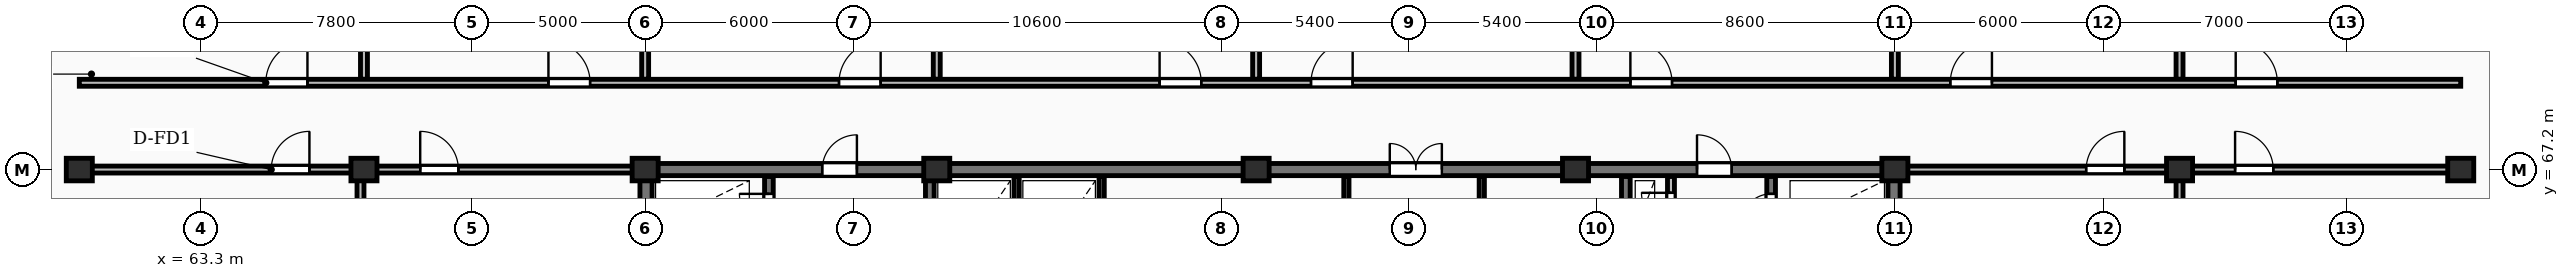
"""IFC4 building model, lengths in metres.
Left out: names, types, materials, properties, quantities, classifications, styles, units other than length and angle.
Written with IfcOpenShell. Run it as: python <this file> out.ifc"""

import sys

from ifc_helpers import new_model, si_unit, direction, frame, frame_2d, origin, origin_2d, place, context, subcontext, project, spatial, rectangle, extrude, element, fill, save


model = new_model("IFC4")
c1 = context("Model", 3, precision=1e-05, world=origin(), true_north=direction((0.0, 1.0)))
c2 = subcontext(c1, "Body", "Model", "MODEL_VIEW")
j1 = project(units=[si_unit("LENGTHUNIT", "METRE"), si_unit("PLANEANGLEUNIT", "RADIAN")], contexts=[c1])
p1 = place(None, origin())
s1 = spatial("IfcSite", under=j1, at=p1, CompositionType="ELEMENT")
p2 = place(p1, origin())
s2 = spatial("IfcBuilding", under=s1, at=p2, CompositionType="ELEMENT")
p3 = place(p2, frame((0.0, 0.0, 259.7)))
s3 = spatial("IfcBuildingStorey", under=s2, at=p3, CompositionType="ELEMENT", Elevation=259.7)
for number, where, z_axis, x_axis in (
    (1, (59.8, 67.2, 0.0), (0.0, 0.0, 1.0), (1.0, 0.0, 0.0)),
    (2, (68.0, 67.2, 0.0), (0.0, 0.0, 1.0), (1.0, 0.0, 0.0)),
    (3, (76.1, 67.2, 0.0), (0.0, 0.0, 1.0), (1.0, 0.0, 0.0)),
    (4, (84.5, 67.2, 0.0), (0.0, 0.0, 1.0), (1.0, 0.0, 0.0)),
    (5, (93.7, 67.2, 0.0), (0.0, 0.0, 1.0), (1.0, 0.0, 0.0)),
    (6, (102.9, 67.2, 0.0), (0.0, 0.0, 1.0), (1.0, 0.0, 0.0)),
    (7, (112.1, 67.2, 0.0), (0.0, 0.0, 1.0), (1.0, 0.0, 0.0)),
    (8, (120.3, 67.2, 0.0), (0.0, 0.0, 1.0), (1.0, 0.0, 0.0)),
    (9, (128.4, 67.2, 0.0), (0.0, 0.0, 1.0), (1.0, 0.0, 0.0)),
):
    element("IfcColumn", number, at=place(p3, frame(where, z_axis=z_axis, x_axis=x_axis)), inside=s3, PredefinedType="COLUMN", context=c2, shape_type="SweptSolid", body=[
        extrude(rectangle(XDim=0.75, YDim=0.65, at=origin_2d()), origin(), (0.0, 0.0, 1.0), 4.5),
    ])
for number, where, z_axis, x_axis in (
    (10, (76.125, 55.375, 0.0), (0.0, 0.0, 1.0), (0.0, 1.0, 0.0)),
    (11, (112.075, 55.375, 0.0), (0.0, 0.0, 1.0), (0.0, 1.0, 0.0)),
):
    element("IfcWall", number, at=place(p3, frame(where, z_axis=z_axis, x_axis=x_axis)), inside=s3, PredefinedType="SHEAR", context=c2, shape_type="SweptSolid", body=[
        extrude(rectangle(XDim=11.65, YDim=0.35, at=frame_2d((5.825, 0.0))), origin(), (0.0, 0.0, 1.0), 4.5),
    ])
p4 = place(p3, frame((75.95, 67.2, 0.0), z_axis=(0.0, 0.0, 1.0), x_axis=(1.0, 0.0, 0.0)))
e12 = element("IfcWall", 12, at=p4, inside=s3, PredefinedType="SHEAR", context=c2, shape_type="SweptSolid", body=[
    extrude(rectangle(XDim=36.3, YDim=0.35, at=frame_2d((18.15, 0.0))), origin(), (0.0, 0.0, 1.0), 4.5),
])
p5 = place(p4, frame((5.25, 0.0, 0.0)))
e13 = element("IfcOpeningElement", 13, at=p5, cuts=e12, PredefinedType="OPENING", context=c2, shape_type="SweptSolid", body=[
    extrude(rectangle(XDim=1.0, YDim=2.15, at=frame_2d((0.5, 1.075))), frame((0.0, 0.185, 0.0), z_axis=(0.0, -1.0, 0.0), x_axis=(1.0, 0.0, 0.0)), (0.0, 0.0, 1.0), 0.37),
])
p6 = place(p4, frame((21.6, 0.0, 0.0)))
e14 = element("IfcOpeningElement", 14, at=p6, cuts=e12, PredefinedType="OPENING", context=c2, shape_type="SweptSolid", body=[
    extrude(rectangle(XDim=1.5, YDim=2.2, at=frame_2d((0.75, 1.1))), frame((0.0, 0.185, 0.0), z_axis=(0.0, -1.0, 0.0), x_axis=(1.0, 0.0, 0.0)), (0.0, 0.0, 1.0), 0.37),
])
p7 = place(p4, frame((30.45, 0.0, 0.0)))
e15 = element("IfcOpeningElement", 15, at=p7, cuts=e12, PredefinedType="OPENING", context=c2, shape_type="SweptSolid", body=[
    extrude(rectangle(XDim=1.0, YDim=2.15, at=frame_2d((0.5, 1.075))), frame((0.0, 0.185, 0.0), z_axis=(0.0, -1.0, 0.0), x_axis=(1.0, 0.0, 0.0)), (0.0, 0.0, 1.0), 0.37),
])
p8 = place(p3, frame((79.665, 55.4, 0.0), z_axis=(0.0, 0.0, 1.0), x_axis=(0.0, 1.0, 0.0)))
e16 = element("IfcWall", 16, at=p8, inside=s3, PredefinedType="SHEAR", context=c2, shape_type="SweptSolid", body=[
    extrude(rectangle(XDim=11.6, YDim=0.25, at=frame_2d((5.8, 0.0))), origin(), (0.0, 0.0, 1.0), 4.5),
])
p9 = place(p8, frame((0.55, 0.0, 0.0)))
e17 = element("IfcOpeningElement", 17, at=p9, cuts=e16, PredefinedType="OPENING", context=c2, shape_type="SweptSolid", body=[
    extrude(rectangle(XDim=0.85, YDim=2.05, at=frame_2d((0.425, 1.025))), frame((0.0, 0.135, 0.0), z_axis=(0.0, -1.0, 0.0), x_axis=(1.0, 0.0, 0.0)), (0.0, 0.0, 1.0), 0.27),
])
p10 = place(p8, frame((8.4, 0.0, 0.0)))
e18 = element("IfcOpeningElement", 18, at=p10, cuts=e16, PredefinedType="OPENING", context=c2, shape_type="SweptSolid", body=[
    extrude(rectangle(XDim=1.1, YDim=2.1, at=frame_2d((0.55, 1.05))), frame((0.0, 0.135, 0.0), z_axis=(0.0, -1.0, 0.0), x_axis=(1.0, 0.0, 0.0)), (0.0, 0.0, 1.0), 0.27),
])
p11 = place(p8, frame((10.25, 0.0, 0.0)))
e19 = element("IfcOpeningElement", 19, at=p11, cuts=e16, PredefinedType="OPENING", context=c2, shape_type="SweptSolid", body=[
    extrude(rectangle(XDim=0.85, YDim=2.05, at=frame_2d((0.425, 1.025))), frame((0.0, 0.135, 0.0), z_axis=(0.0, -1.0, 0.0), x_axis=(1.0, 0.0, 0.0)), (0.0, 0.0, 1.0), 0.27),
])
p12 = place(p3, frame((84.3, 55.4, 0.0), z_axis=(0.0, 0.0, 1.0), x_axis=(0.0, 1.0, 0.0)))
e20 = element("IfcWall", 20, at=p12, inside=s3, PredefinedType="SHEAR", context=c2, shape_type="SweptSolid", body=[
    extrude(rectangle(XDim=11.6, YDim=0.25, at=frame_2d((5.8, 0.0))), origin(), (0.0, 0.0, 1.0), 4.5),
])
p13 = place(p12, frame((5.2, 0.0, 0.0)))
e21 = element("IfcOpeningElement", 21, at=p13, cuts=e20, PredefinedType="OPENING", context=c2, shape_type="SweptSolid", body=[
    extrude(rectangle(XDim=1.1, YDim=2.1, at=frame_2d((0.55, 1.05))), frame((0.0, 0.135, 0.0), z_axis=(0.0, -1.0, 0.0), x_axis=(1.0, 0.0, 0.0)), (0.0, 0.0, 1.0), 0.27),
])
for number, where, z_axis, x_axis in (
    (22, (86.8, 63.4, 0.0), (0.0, 0.0, 1.0), (0.0, 1.0, 0.0)),
    (23, (89.25, 63.4, 0.0), (0.0, 0.0, 1.0), (0.0, 1.0, 0.0)),
    (24, (96.3, 63.4, 0.0), (0.0, 0.0, 1.0), (0.0, 1.0, 0.0)),
    (25, (100.2, 63.4, 0.0), (0.0, 0.0, 1.0), (0.0, 1.0, 0.0)),
):
    element("IfcWall", number, at=place(p3, frame(where, z_axis=z_axis, x_axis=x_axis)), inside=s3, PredefinedType="PARTITIONING", context=c2, shape_type="SweptSolid", body=[
        extrude(rectangle(XDim=3.6, YDim=0.15, at=frame_2d((1.8, 0.0))), origin(), (0.0, 0.0, 1.0), 4.23),
    ])
p14 = place(p3, frame((105.65, 65.28, 0.0), z_axis=(0.0, 0.0, 1.0), x_axis=(0.0, 1.0, 0.0)))
e26 = element("IfcWall", 26, at=p14, inside=s3, PredefinedType="PARTITIONING", context=c2, shape_type="SweptSolid", body=[
    extrude(rectangle(XDim=1.72, YDim=0.2, at=frame_2d((0.86, 0.0))), origin(), (0.0, 0.0, 1.0), 4.23),
])
p15 = place(p14, frame((0.4, 0.0, 0.0)))
e27 = element("IfcOpeningElement", 27, at=p15, cuts=e26, PredefinedType="OPENING", context=c2, shape_type="SweptSolid", body=[
    extrude(rectangle(XDim=0.85, YDim=2.05, at=frame_2d((0.425, 1.025))), frame((0.0, 0.11, 0.0), z_axis=(0.0, -1.0, 0.0), x_axis=(1.0, 0.0, 0.0)), (0.0, 0.0, 1.0), 0.22),
])
p16 = place(p3, frame((104.35, 58.4, 0.0), z_axis=(0.0, 0.0, 1.0), x_axis=(0.0, 1.0, 0.0)))
e28 = element("IfcWall", 28, at=p16, inside=s3, PredefinedType="SHEAR", context=c2, shape_type="SweptSolid", body=[
    extrude(rectangle(XDim=8.6, YDim=0.25, at=frame_2d((4.3, 0.0))), origin(), (0.0, 0.0, 1.0), 4.5),
])
p17 = place(p16, frame((1.8, 0.0, 0.0)))
e29 = element("IfcOpeningElement", 29, at=p17, cuts=e28, PredefinedType="OPENING", context=c2, shape_type="SweptSolid", body=[
    extrude(rectangle(XDim=1.1, YDim=2.1, at=frame_2d((0.55, 1.05))), frame((0.0, 0.135, 0.0), z_axis=(0.0, -1.0, 0.0), x_axis=(1.0, 0.0, 0.0)), (0.0, 0.0, 1.0), 0.27),
])
p18 = place(p3, frame((108.535, 55.4, 0.0), z_axis=(0.0, 0.0, 1.0), x_axis=(0.0, 1.0, 0.0)))
e30 = element("IfcWall", 30, at=p18, inside=s3, PredefinedType="SHEAR", context=c2, shape_type="SweptSolid", body=[
    extrude(rectangle(XDim=11.6, YDim=0.25, at=frame_2d((5.8, 0.0))), origin(), (0.0, 0.0, 1.0), 4.5),
])
p19 = place(p18, frame((8.2, 0.0, 0.0)))
e31 = element("IfcOpeningElement", 31, at=p19, cuts=e30, PredefinedType="OPENING", context=c2, shape_type="SweptSolid", body=[
    extrude(rectangle(XDim=1.1, YDim=2.1, at=frame_2d((0.55, 1.05))), frame((0.0, 0.135, 0.0), z_axis=(0.0, -1.0, 0.0), x_axis=(1.0, 0.0, 0.0)), (0.0, 0.0, 1.0), 0.27),
])
p20 = place(p18, frame((10.25, 0.0, 0.0)))
e32 = element("IfcOpeningElement", 32, at=p20, cuts=e30, PredefinedType="OPENING", context=c2, shape_type="SweptSolid", body=[
    extrude(rectangle(XDim=0.85, YDim=2.05, at=frame_2d((0.425, 1.025))), frame((0.0, 0.135, 0.0), z_axis=(0.0, -1.0, 0.0), x_axis=(1.0, 0.0, 0.0)), (0.0, 0.0, 1.0), 0.27),
])
for number, where, z_axis, x_axis in (
    (33, (68.0, 69.8, 0.0), (0.0, 0.0, 1.0), (0.0, 1.0, 0.0)),
    (34, (76.1, 69.8, 0.0), (0.0, 0.0, 1.0), (0.0, 1.0, 0.0)),
    (35, (84.5, 69.8, 0.0), (0.0, 0.0, 1.0), (0.0, 1.0, 0.0)),
    (36, (93.7, 69.8, 0.0), (0.0, 0.0, 1.0), (0.0, 1.0, 0.0)),
    (37, (102.9, 69.8, 0.0), (0.0, 0.0, 1.0), (0.0, 1.0, 0.0)),
    (38, (112.1, 69.8, 0.0), (0.0, 0.0, 1.0), (0.0, 1.0, 0.0)),
    (39, (120.3, 69.8, 0.0), (0.0, 0.0, 1.0), (0.0, 1.0, 0.0)),
):
    element("IfcWall", number, at=place(p3, frame(where, z_axis=z_axis, x_axis=x_axis)), inside=s3, PredefinedType="PARTITIONING", context=c2, shape_type="SweptSolid", body=[
        extrude(rectangle(XDim=9.25, YDim=0.2, at=frame_2d((4.625, 0.0))), origin(), (0.0, 0.0, 1.0), 3.537),
    ])
p21 = place(p3, frame((59.8, 69.7, 0.0), z_axis=(0.0, 0.0, 1.0), x_axis=(1.0, 0.0, 0.0)))
e40 = element("IfcWall", 40, at=p21, inside=s3, PredefinedType="PARTITIONING", context=c2, shape_type="SweptSolid", body=[
    extrude(rectangle(XDim=68.6, YDim=0.2, at=frame_2d((34.3, 0.0))), origin(), (0.0, 0.0, 1.0), 4.23),
])
p22 = place(p21, frame((5.372, 0.0, 0.0)))
e41 = element("IfcOpeningElement", 41, at=p22, cuts=e40, PredefinedType="OPENING", context=c2, shape_type="SweptSolid", body=[
    extrude(rectangle(XDim=1.2, YDim=2.15, at=frame_2d((0.6, 1.075))), frame((0.0, 0.11, 0.0), z_axis=(0.0, -1.0, 0.0), x_axis=(1.0, 0.0, 0.0)), (0.0, 0.0, 1.0), 0.22),
])
p23 = place(p21, frame((13.514, 0.0, 0.0)))
e42 = element("IfcOpeningElement", 42, at=p23, cuts=e40, PredefinedType="OPENING", context=c2, shape_type="SweptSolid", body=[
    extrude(rectangle(XDim=1.2, YDim=2.15, at=frame_2d((0.6, 1.075))), frame((0.0, 0.11, 0.0), z_axis=(0.0, -1.0, 0.0), x_axis=(1.0, 0.0, 0.0)), (0.0, 0.0, 1.0), 0.22),
])
p24 = place(p21, frame((21.884, 0.0, 0.0)))
e43 = element("IfcOpeningElement", 43, at=p24, cuts=e40, PredefinedType="OPENING", context=c2, shape_type="SweptSolid", body=[
    extrude(rectangle(XDim=1.2, YDim=2.15, at=frame_2d((0.6, 1.075))), frame((0.0, 0.11, 0.0), z_axis=(0.0, -1.0, 0.0), x_axis=(1.0, 0.0, 0.0)), (0.0, 0.0, 1.0), 0.22),
])
p25 = place(p21, frame((31.119, 0.0, 0.0)))
e44 = element("IfcOpeningElement", 44, at=p25, cuts=e40, PredefinedType="OPENING", context=c2, shape_type="SweptSolid", body=[
    extrude(rectangle(XDim=1.2, YDim=2.15, at=frame_2d((0.6, 1.075))), frame((0.0, 0.11, 0.0), z_axis=(0.0, -1.0, 0.0), x_axis=(1.0, 0.0, 0.0)), (0.0, 0.0, 1.0), 0.22),
])
p26 = place(p21, frame((35.481, 0.0, 0.0)))
e45 = element("IfcOpeningElement", 45, at=p26, cuts=e40, PredefinedType="OPENING", context=c2, shape_type="SweptSolid", body=[
    extrude(rectangle(XDim=1.2, YDim=2.15, at=frame_2d((0.6, 1.075))), frame((0.0, 0.11, 0.0), z_axis=(0.0, -1.0, 0.0), x_axis=(1.0, 0.0, 0.0)), (0.0, 0.0, 1.0), 0.22),
])
p27 = place(p21, frame((44.681, 0.0, 0.0)))
e46 = element("IfcOpeningElement", 46, at=p27, cuts=e40, PredefinedType="OPENING", context=c2, shape_type="SweptSolid", body=[
    extrude(rectangle(XDim=1.2, YDim=2.15, at=frame_2d((0.6, 1.075))), frame((0.0, 0.11, 0.0), z_axis=(0.0, -1.0, 0.0), x_axis=(1.0, 0.0, 0.0)), (0.0, 0.0, 1.0), 0.22),
])
p28 = place(p21, frame((53.896, 0.0, 0.0)))
e47 = element("IfcOpeningElement", 47, at=p28, cuts=e40, PredefinedType="OPENING", context=c2, shape_type="SweptSolid", body=[
    extrude(rectangle(XDim=1.2, YDim=2.15, at=frame_2d((0.6, 1.075))), frame((0.0, 0.11, 0.0), z_axis=(0.0, -1.0, 0.0), x_axis=(1.0, 0.0, 0.0)), (0.0, 0.0, 1.0), 0.22),
])
p29 = place(p21, frame((62.118, 0.0, 0.0)))
e48 = element("IfcOpeningElement", 48, at=p29, cuts=e40, PredefinedType="OPENING", context=c2, shape_type="SweptSolid", body=[
    extrude(rectangle(XDim=1.2, YDim=2.15, at=frame_2d((0.6, 1.075))), frame((0.0, 0.11, 0.0), z_axis=(0.0, -1.0, 0.0), x_axis=(1.0, 0.0, 0.0)), (0.0, 0.0, 1.0), 0.22),
])
p30 = place(p3, frame((67.9, 51.75, 0.0), z_axis=(0.0, 0.0, 1.0), x_axis=(0.0, 1.0, 0.0)))
e49 = element("IfcWall", 49, at=p30, inside=s3, PredefinedType="PARTITIONING", context=c2, shape_type="SweptSolid", body=[
    extrude(rectangle(XDim=15.4, YDim=0.2, at=frame_2d((7.7, 0.0))), origin(), (0.0, 0.0, 1.0), 3.537),
])
p31 = place(p3, frame((59.85, 67.2, 0.0), z_axis=(0.0, 0.0, 1.0), x_axis=(1.0, 0.0, 0.0)))
e50 = element("IfcWall", 50, at=p31, inside=s3, PredefinedType="PARTITIONING", context=c2, shape_type="SweptSolid", body=[
    extrude(rectangle(XDim=16.1, YDim=0.2, at=frame_2d((8.05, 0.0))), origin(), (0.0, 0.0, 1.0), 3.61),
])
p32 = place(p31, frame((5.479, 0.0, 0.0)))
e51 = element("IfcOpeningElement", 51, at=p32, cuts=e50, PredefinedType="OPENING", context=c2, shape_type="SweptSolid", body=[
    extrude(rectangle(XDim=1.1, YDim=2.1, at=frame_2d((0.55, 1.05))), frame((0.0, 0.11, 0.0), z_axis=(0.0, -1.0, 0.0), x_axis=(1.0, 0.0, 0.0)), (0.0, 0.0, 1.0), 0.22),
])
p33 = place(p31, frame((9.77, 0.0, 0.0)))
e52 = element("IfcOpeningElement", 52, at=p33, cuts=e50, PredefinedType="OPENING", context=c2, shape_type="SweptSolid", body=[
    extrude(rectangle(XDim=1.1, YDim=2.1, at=frame_2d((0.55, 1.05))), frame((0.0, 0.11, 0.0), z_axis=(0.0, -1.0, 0.0), x_axis=(1.0, 0.0, 0.0)), (0.0, 0.0, 1.0), 0.22),
])
p34 = place(p3, frame((120.3, 51.75, 0.0), z_axis=(0.0, 0.0, 1.0), x_axis=(0.0, 1.0, 0.0)))
e53 = element("IfcWall", 53, at=p34, inside=s3, PredefinedType="PARTITIONING", context=c2, shape_type="SweptSolid", body=[
    extrude(rectangle(XDim=15.4, YDim=0.2, at=frame_2d((7.7, 0.0))), origin(), (0.0, 0.0, 1.0), 3.537),
])
p35 = place(p3, frame((112.25, 67.2, 0.0), z_axis=(0.0, 0.0, 1.0), x_axis=(1.0, 0.0, 0.0)))
e54 = element("IfcWall", 54, at=p35, inside=s3, PredefinedType="PARTITIONING", context=c2, shape_type="SweptSolid", body=[
    extrude(rectangle(XDim=16.1, YDim=0.2, at=frame_2d((8.05, 0.0))), origin(), (0.0, 0.0, 1.0), 3.61),
])
p36 = place(p35, frame((5.36, 0.0, 0.0)))
e55 = element("IfcOpeningElement", 55, at=p36, cuts=e54, PredefinedType="OPENING", context=c2, shape_type="SweptSolid", body=[
    extrude(rectangle(XDim=1.1, YDim=2.1, at=frame_2d((0.55, 1.05))), frame((0.0, 0.11, 0.0), z_axis=(0.0, -1.0, 0.0), x_axis=(1.0, 0.0, 0.0)), (0.0, 0.0, 1.0), 0.22),
])
p37 = place(p35, frame((9.65, 0.0, 0.0)))
e56 = element("IfcOpeningElement", 56, at=p37, cuts=e54, PredefinedType="OPENING", context=c2, shape_type="SweptSolid", body=[
    extrude(rectangle(XDim=1.1, YDim=2.1, at=frame_2d((0.55, 1.05))), frame((0.0, 0.11, 0.0), z_axis=(0.0, -1.0, 0.0), x_axis=(1.0, 0.0, 0.0)), (0.0, 0.0, 1.0), 0.22),
])
p38 = place(p5, origin())
e57 = element("IfcDoor", 57, at=p38, inside=s3, OperationType="SINGLE_SWING_RIGHT", PredefinedType="DOOR", context=c2, shape_type="SweptSolid", body=[
    extrude(rectangle(XDim=1.0, YDim=2.15, at=frame_2d((0.5, 1.075))), frame((0.0, 0.025, 0.0), z_axis=(0.0, -1.0, 0.0), x_axis=(1.0, 0.0, 0.0)), (0.0, 0.0, 1.0), 0.05),
])
fill(e13, e57)
p39 = place(p6, origin())
e58 = element("IfcDoor", 58, at=p39, inside=s3, OperationType="DOUBLE_DOOR_SINGLE_SWING", PredefinedType="DOOR", context=c2, shape_type="SweptSolid", body=[
    extrude(rectangle(XDim=1.5, YDim=2.2, at=frame_2d((0.75, 1.1))), frame((0.0, 0.025, 0.0), z_axis=(0.0, -1.0, 0.0), x_axis=(1.0, 0.0, 0.0)), (0.0, 0.0, 1.0), 0.05),
])
fill(e14, e58)
p40 = place(p7, origin())
e59 = element("IfcDoor", 59, at=p40, inside=s3, OperationType="SINGLE_SWING_LEFT", PredefinedType="DOOR", context=c2, shape_type="SweptSolid", body=[
    extrude(rectangle(XDim=1.0, YDim=2.15, at=frame_2d((0.5, 1.075))), frame((0.0, 0.025, 0.0), z_axis=(0.0, -1.0, 0.0), x_axis=(1.0, 0.0, 0.0)), (0.0, 0.0, 1.0), 0.05),
])
fill(e15, e59)
p41 = place(p11, origin())
e60 = element("IfcDoor", 60, at=p41, inside=s3, OperationType="SINGLE_SWING_RIGHT", PredefinedType="DOOR", context=c2, shape_type="SweptSolid", body=[
    extrude(rectangle(XDim=0.85, YDim=2.05, at=frame_2d((0.425, 1.025))), frame((0.0, 0.025, 0.0), z_axis=(0.0, -1.0, 0.0), x_axis=(1.0, 0.0, 0.0)), (0.0, 0.0, 1.0), 0.05),
])
fill(e19, e60)
p42 = place(p15, origin())
e61 = element("IfcDoor", 61, at=p42, inside=s3, OperationType="SINGLE_SWING_RIGHT", PredefinedType="DOOR", context=c2, shape_type="SweptSolid", body=[
    extrude(rectangle(XDim=0.85, YDim=2.05, at=frame_2d((0.425, 1.025))), frame((0.0, 0.025, 0.0), z_axis=(0.0, -1.0, 0.0), x_axis=(1.0, 0.0, 0.0)), (0.0, 0.0, 1.0), 0.05),
])
fill(e27, e61)
p43 = place(p20, origin())
e62 = element("IfcDoor", 62, at=p43, inside=s3, OperationType="SINGLE_SWING_LEFT", PredefinedType="DOOR", context=c2, shape_type="SweptSolid", body=[
    extrude(rectangle(XDim=0.85, YDim=2.05, at=frame_2d((0.425, 1.025))), frame((0.0, 0.025, 0.0), z_axis=(0.0, -1.0, 0.0), x_axis=(1.0, 0.0, 0.0)), (0.0, 0.0, 1.0), 0.05),
])
fill(e32, e62)
p44 = place(p22, origin())
e63 = element("IfcDoor", 63, at=p44, inside=s3, OperationType="SINGLE_SWING_RIGHT", PredefinedType="DOOR", context=c2, shape_type="SweptSolid", body=[
    extrude(rectangle(XDim=1.2, YDim=2.15, at=frame_2d((0.6, 1.075))), frame((0.0, 0.025, 0.0), z_axis=(0.0, -1.0, 0.0), x_axis=(1.0, 0.0, 0.0)), (0.0, 0.0, 1.0), 0.05),
])
fill(e41, e63)
p45 = place(p23, origin())
e64 = element("IfcDoor", 64, at=p45, inside=s3, OperationType="SINGLE_SWING_LEFT", PredefinedType="DOOR", context=c2, shape_type="SweptSolid", body=[
    extrude(rectangle(XDim=1.2, YDim=2.15, at=frame_2d((0.6, 1.075))), frame((0.0, 0.025, 0.0), z_axis=(0.0, -1.0, 0.0), x_axis=(1.0, 0.0, 0.0)), (0.0, 0.0, 1.0), 0.05),
])
fill(e42, e64)
p46 = place(p24, origin())
e65 = element("IfcDoor", 65, at=p46, inside=s3, OperationType="SINGLE_SWING_RIGHT", PredefinedType="DOOR", context=c2, shape_type="SweptSolid", body=[
    extrude(rectangle(XDim=1.2, YDim=2.15, at=frame_2d((0.6, 1.075))), frame((0.0, 0.025, 0.0), z_axis=(0.0, -1.0, 0.0), x_axis=(1.0, 0.0, 0.0)), (0.0, 0.0, 1.0), 0.05),
])
fill(e43, e65)
p47 = place(p25, origin())
e66 = element("IfcDoor", 66, at=p47, inside=s3, OperationType="SINGLE_SWING_LEFT", PredefinedType="DOOR", context=c2, shape_type="SweptSolid", body=[
    extrude(rectangle(XDim=1.2, YDim=2.15, at=frame_2d((0.6, 1.075))), frame((0.0, 0.025, 0.0), z_axis=(0.0, -1.0, 0.0), x_axis=(1.0, 0.0, 0.0)), (0.0, 0.0, 1.0), 0.05),
])
fill(e44, e66)
p48 = place(p26, origin())
e67 = element("IfcDoor", 67, at=p48, inside=s3, OperationType="SINGLE_SWING_RIGHT", PredefinedType="DOOR", context=c2, shape_type="SweptSolid", body=[
    extrude(rectangle(XDim=1.2, YDim=2.15, at=frame_2d((0.6, 1.075))), frame((0.0, 0.025, 0.0), z_axis=(0.0, -1.0, 0.0), x_axis=(1.0, 0.0, 0.0)), (0.0, 0.0, 1.0), 0.05),
])
fill(e45, e67)
p49 = place(p27, origin())
e68 = element("IfcDoor", 68, at=p49, inside=s3, OperationType="SINGLE_SWING_LEFT", PredefinedType="DOOR", context=c2, shape_type="SweptSolid", body=[
    extrude(rectangle(XDim=1.2, YDim=2.15, at=frame_2d((0.6, 1.075))), frame((0.0, 0.025, 0.0), z_axis=(0.0, -1.0, 0.0), x_axis=(1.0, 0.0, 0.0)), (0.0, 0.0, 1.0), 0.05),
])
fill(e46, e68)
p50 = place(p28, origin())
e69 = element("IfcDoor", 69, at=p50, inside=s3, OperationType="SINGLE_SWING_RIGHT", PredefinedType="DOOR", context=c2, shape_type="SweptSolid", body=[
    extrude(rectangle(XDim=1.2, YDim=2.15, at=frame_2d((0.6, 1.075))), frame((0.0, 0.025, 0.0), z_axis=(0.0, -1.0, 0.0), x_axis=(1.0, 0.0, 0.0)), (0.0, 0.0, 1.0), 0.05),
])
fill(e47, e69)
p51 = place(p29, origin())
e70 = element("IfcDoor", 70, at=p51, inside=s3, OperationType="SINGLE_SWING_LEFT", PredefinedType="DOOR", context=c2, shape_type="SweptSolid", body=[
    extrude(rectangle(XDim=1.2, YDim=2.15, at=frame_2d((0.6, 1.075))), frame((0.0, 0.025, 0.0), z_axis=(0.0, -1.0, 0.0), x_axis=(1.0, 0.0, 0.0)), (0.0, 0.0, 1.0), 0.05),
])
fill(e48, e70)
p52 = place(p32, origin())
e71 = element("IfcDoor", 71, at=p52, inside=s3, OperationType="SINGLE_SWING_RIGHT", PredefinedType="DOOR", context=c2, shape_type="SweptSolid", body=[
    extrude(rectangle(XDim=1.1, YDim=2.1, at=frame_2d((0.55, 1.05))), frame((0.0, 0.025, 0.0), z_axis=(0.0, -1.0, 0.0), x_axis=(1.0, 0.0, 0.0)), (0.0, 0.0, 1.0), 0.05),
])
fill(e51, e71)
p53 = place(p33, origin())
e72 = element("IfcDoor", 72, at=p53, inside=s3, OperationType="SINGLE_SWING_LEFT", PredefinedType="DOOR", context=c2, shape_type="SweptSolid", body=[
    extrude(rectangle(XDim=1.1, YDim=2.1, at=frame_2d((0.55, 1.05))), frame((0.0, 0.025, 0.0), z_axis=(0.0, -1.0, 0.0), x_axis=(1.0, 0.0, 0.0)), (0.0, 0.0, 1.0), 0.05),
])
fill(e52, e72)
p54 = place(p36, origin())
e73 = element("IfcDoor", 73, at=p54, inside=s3, OperationType="SINGLE_SWING_RIGHT", PredefinedType="DOOR", context=c2, shape_type="SweptSolid", body=[
    extrude(rectangle(XDim=1.1, YDim=2.1, at=frame_2d((0.55, 1.05))), frame((0.0, 0.025, 0.0), z_axis=(0.0, -1.0, 0.0), x_axis=(1.0, 0.0, 0.0)), (0.0, 0.0, 1.0), 0.05),
])
fill(e55, e73)
p55 = place(p37, origin())
e74 = element("IfcDoor", 74, at=p55, inside=s3, OperationType="SINGLE_SWING_LEFT", PredefinedType="DOOR", context=c2, shape_type="SweptSolid", body=[
    extrude(rectangle(XDim=1.1, YDim=2.1, at=frame_2d((0.55, 1.05))), frame((0.0, 0.025, 0.0), z_axis=(0.0, -1.0, 0.0), x_axis=(1.0, 0.0, 0.0)), (0.0, 0.0, 1.0), 0.05),
])
fill(e56, e74)
save(model, sys.argv[1])
